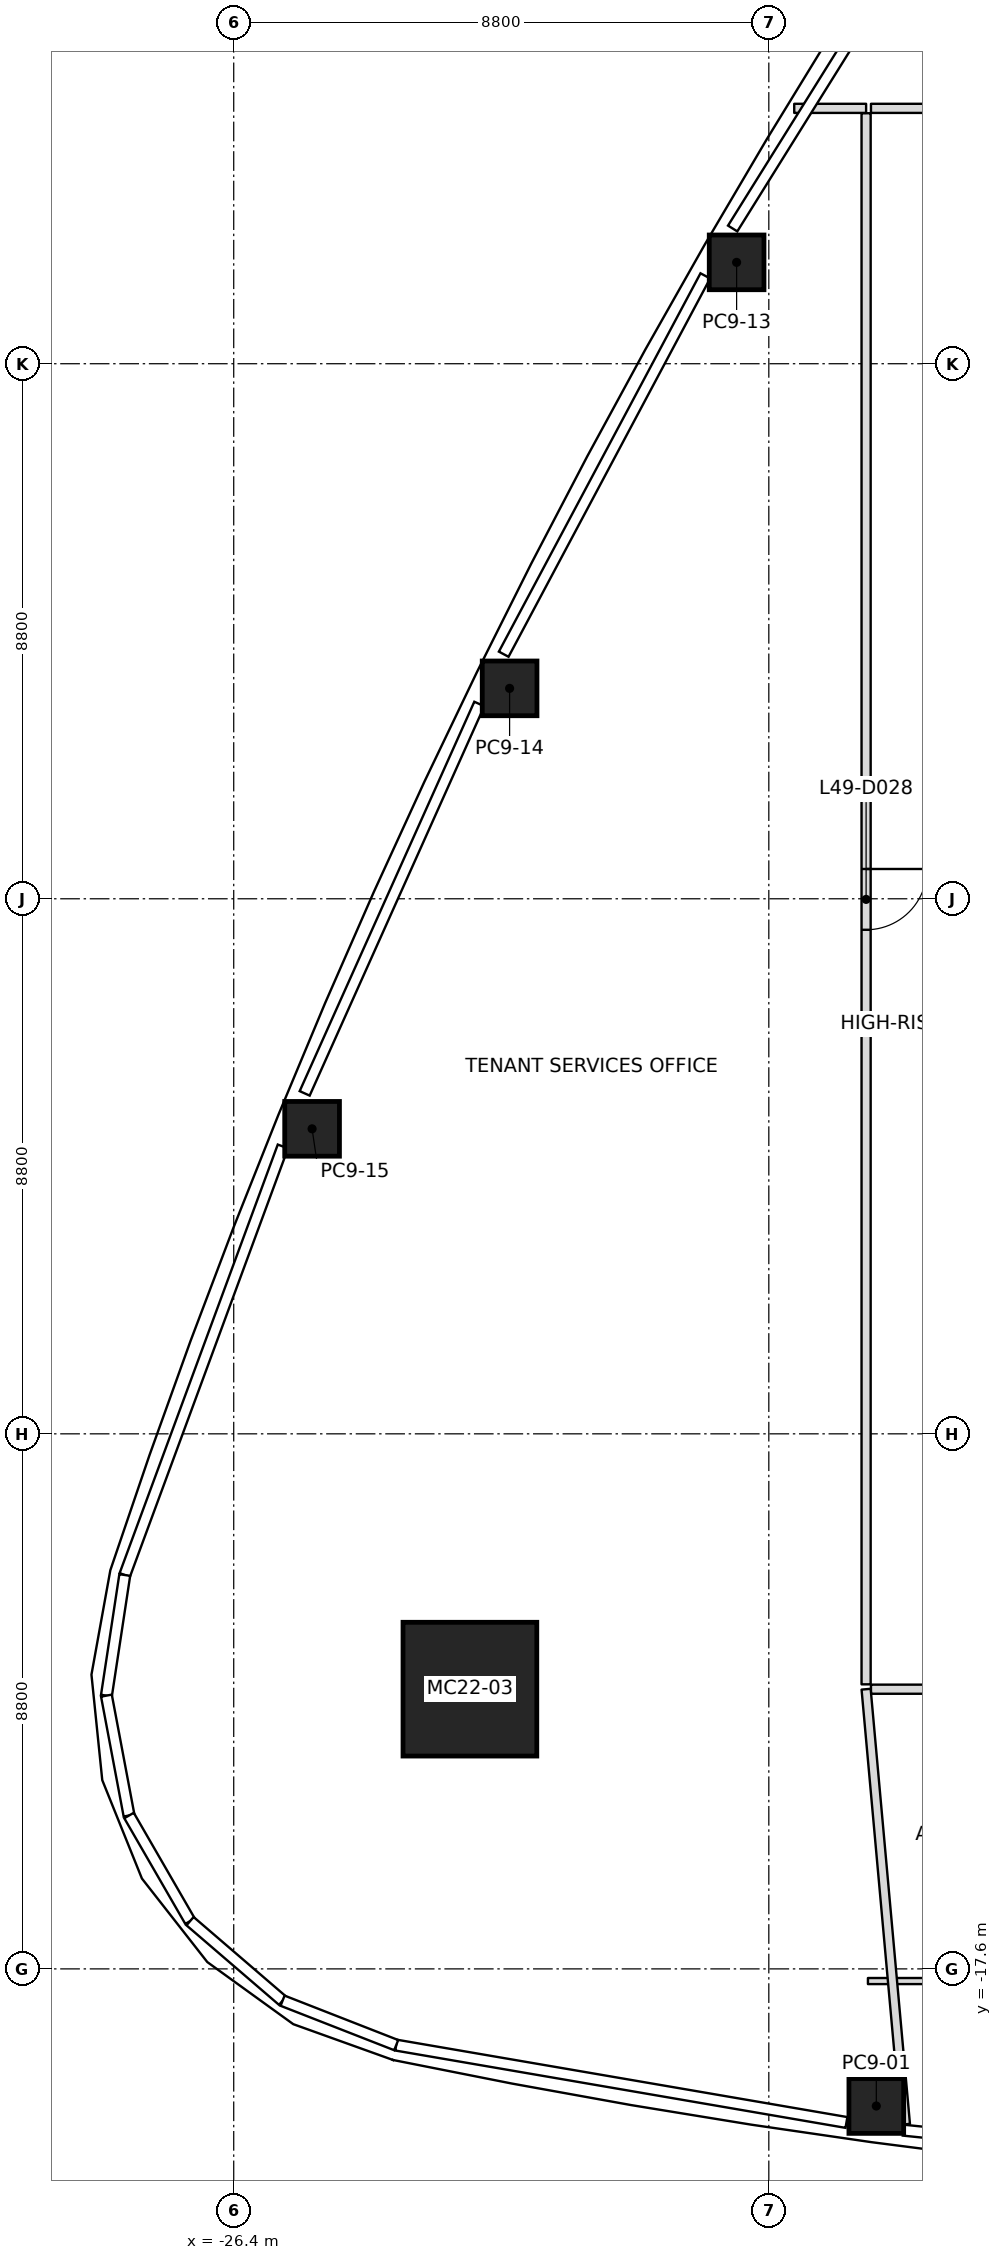
"""IFC4 building model, lengths in metres.
Left out: names, types, materials, properties, quantities, classifications, styles, units other than length and angle.
Written with IfcOpenShell. Run it as: python <this file> out.ifc"""

import sys

from ifc_helpers import new_model, si_unit, direction, frame, frame_2d, origin, origin_2d, place, context, subcontext, project, spatial, rectangle, extrude, clip, halfspace, element, fill, save


model = new_model("IFC4")
c1 = context("Model", 3, precision=1e-05, world=origin(), true_north=direction((0.0, 1.0)))
c2 = subcontext(c1, "Body", "Model", "MODEL_VIEW")
j1 = project(units=[si_unit("LENGTHUNIT", "METRE"), si_unit("PLANEANGLEUNIT", "RADIAN")], contexts=[c1])
p1 = place(None, origin())
s1 = spatial("IfcSite", under=j1, at=p1, CompositionType="ELEMENT")
p2 = place(p1, origin())
s2 = spatial("IfcBuilding", under=s1, at=p2, CompositionType="ELEMENT")
p3 = place(p2, frame((0.0, 0.0, 219.8)))
s3 = spatial("IfcBuildingStorey", under=s2, at=p3, CompositionType="ELEMENT", Elevation=219.8)
p4 = place(p3, frame((-22.516, -13.0, 0.0), z_axis=(0.015527667253, 0.008950445753, 0.999839377635), x_axis=(0.999879438507, -0.000138996301, -0.015527045126)))
e1 = element("IfcColumn", 1, at=p4, inside=s3, PredefinedType="COLUMN", context=c2, shape_type="SweptSolid", body=[
    clip(clip(extrude(rectangle(XDim=2.2, YDim=2.2, at=origin_2d()), origin(), (0.0, 0.0, 1.0), 7.201), halfspace(frame((0.0, 0.0, 0.003)), True)), halfspace(frame((0.0, 0.0, 7.19)), False)),
])
p5 = place(p3, frame((-15.832, -19.855, 0.0), z_axis=(0.009731160111, 0.005764101808, 0.999936037781), x_axis=(-0.990706613393, 0.135727393239, 0.008858944803)))
e2 = element("IfcColumn", 2, at=p5, inside=s3, PredefinedType="COLUMN", context=c2, shape_type="SweptSolid", body=[
    clip(clip(extrude(rectangle(XDim=0.9, YDim=0.9, at=origin_2d()), origin(), (0.0, 0.0, 1.0), 7.2), halfspace(frame((0.0, 0.0, 0.001)), True)), halfspace(frame((0.0, 0.0, 7.197)), False)),
])
p6 = place(p3, frame((-18.13, 10.467, 0.0), z_axis=(0.005493091126, -0.003153441202, 0.999979940678), x_axis=(0.499992456431, 0.866029758883, -1.5530513e-05)))
e3 = element("IfcColumn", 3, at=p6, inside=s3, PredefinedType="COLUMN", context=c2, shape_type="SweptSolid", body=[
    clip(clip(extrude(rectangle(XDim=0.9, YDim=0.9, at=origin_2d()), origin(), (0.0, 0.0, 1.0), 7.2), halfspace(frame((0.0, 0.0, 0.0)), True)), halfspace(frame((0.0, 0.0, 7.199)), False)),
])
p7 = place(p3, frame((-21.863, 3.461, 0.0), z_axis=(0.007832652989, 0.001118950427, 0.999968698259), x_axis=(0.439944481987, 0.898013943218, -0.004450904868)))
e4 = element("IfcColumn", 4, at=p7, inside=s3, PredefinedType="COLUMN", context=c2, shape_type="SweptSolid", body=[
    clip(clip(extrude(rectangle(XDim=0.9, YDim=0.9, at=origin_2d()), origin(), (0.0, 0.0, 1.0), 7.2), halfspace(frame((0.0, 0.0, 0.001)), True)), halfspace(frame((0.0, 0.0, 7.198)), False)),
])
p8 = place(p3, frame((-25.111, -3.784, 0.0), z_axis=(0.009900687447, 0.005560660073, 0.999935525645), x_axis=(0.377861048249, 0.925819636439, -0.00888982559)))
e5 = element("IfcColumn", 5, at=p8, inside=s3, PredefinedType="COLUMN", context=c2, shape_type="SweptSolid", body=[
    clip(clip(extrude(rectangle(XDim=0.9, YDim=0.9, at=origin_2d()), origin(), (0.0, 0.0, 1.0), 7.2), halfspace(frame((0.0, 0.0, 0.001)), True)), halfspace(frame((0.0, 0.0, 7.197)), False)),
])
p9 = place(p3, frame((-16.0, 13.0, 0.0), z_axis=(0.0, 0.0, 1.0), x_axis=(-1.0, 0.0, 0.0)))
e6 = element("IfcWall", 6, at=p9, inside=s3, PredefinedType="PARTITIONING", context=c2, shape_type="SweptSolid", body=[
    extrude(rectangle(XDim=1.182, YDim=0.15, at=frame_2d((0.591, 0.0))), origin(), (0.0, 0.0, 1.0), 6.434),
])
p10 = place(p3, frame((-16.0, -13.0, 0.0), z_axis=(0.0, 0.0, 1.0), x_axis=(0.089975086332, -0.995944016418, 0.0)))
e7 = element("IfcWall", 7, at=p10, inside=s3, PredefinedType="PARTITIONING", context=c2, shape_type="SweptSolid", body=[
    extrude(rectangle(XDim=7.185, YDim=0.15, at=frame_2d((3.593, 0.0))), origin(), (0.0, 0.0, 1.0), 6.284),
])
p11 = place(p3, frame((-16.0, 12.92, 0.0), z_axis=(0.0, 0.0, 1.0), x_axis=(0.0, -1.0, 0.0)))
e8 = element("IfcWall", 8, at=p11, inside=s3, PredefinedType="PARTITIONING", context=c2, shape_type="SweptSolid", body=[
    extrude(rectangle(XDim=25.84, YDim=0.15, at=frame_2d((12.92, 0.0))), origin(), (0.0, 0.0, 1.0), 6.367),
])
p12 = place(p11, frame((12.43, 0.0, 0.0)))
e9 = element("IfcOpeningElement", 9, at=p12, cuts=e8, PredefinedType="OPENING", context=c2, shape_type="SweptSolid", body=[
    extrude(rectangle(XDim=1.0, YDim=2.1, at=frame_2d((0.5, 1.05))), frame((0.0, 0.075, 0.0), z_axis=(0.0, -1.0, 0.0), x_axis=(1.0, 0.0, 0.0)), (0.0, 0.0, 1.0), 0.15),
])
p13 = place(p3, frame((-15.92, -13.0, 0.0), z_axis=(0.0, 0.0, 1.0), x_axis=(1.0, 0.0, 0.0)))
e10 = element("IfcWall", 10, at=p13, inside=s3, PredefinedType="PARTITIONING", context=c2, shape_type="SweptSolid", body=[
    extrude(rectangle(XDim=31.84, YDim=0.15, at=frame_2d((15.92, 0.0))), origin(), (0.0, 0.0, 1.0), 6.367),
])
p14 = place(p13, frame((1.52, 0.0, 0.0)))
e11 = element("IfcOpeningElement", 11, at=p14, cuts=e10, PredefinedType="OPENING", context=c2, shape_type="SweptSolid", body=[
    extrude(rectangle(XDim=1.0, YDim=2.1, at=frame_2d((0.5, 1.05))), frame((0.0, 0.075, 0.0), z_axis=(0.0, -1.0, 0.0), x_axis=(1.0, 0.0, 0.0)), (0.0, 0.0, 1.0), 0.15),
])
p15 = place(p13, frame((9.57, 0.0, 0.0)))
e12 = element("IfcOpeningElement", 12, at=p15, cuts=e10, PredefinedType="OPENING", context=c2, shape_type="SweptSolid", body=[
    extrude(rectangle(XDim=1.0, YDim=2.1, at=frame_2d((0.5, 1.05))), frame((0.0, 0.075, 0.0), z_axis=(0.0, -1.0, 0.0), x_axis=(1.0, 0.0, 0.0)), (0.0, 0.0, 1.0), 0.15),
])
p16 = place(p13, frame((17.52, 0.0, 0.0)))
e13 = element("IfcOpeningElement", 13, at=p16, cuts=e10, PredefinedType="OPENING", context=c2, shape_type="SweptSolid", body=[
    extrude(rectangle(XDim=1.0, YDim=2.1, at=frame_2d((0.5, 1.05))), frame((0.0, 0.075, 0.0), z_axis=(0.0, -1.0, 0.0), x_axis=(1.0, 0.0, 0.0)), (0.0, 0.0, 1.0), 0.15),
])
p17 = place(p13, frame((25.57, 0.0, 0.0)))
e14 = element("IfcOpeningElement", 14, at=p17, cuts=e10, PredefinedType="OPENING", context=c2, shape_type="SweptSolid", body=[
    extrude(rectangle(XDim=1.0, YDim=2.1, at=frame_2d((0.5, 1.05))), frame((0.0, 0.075, 0.0), z_axis=(0.0, -1.0, 0.0), x_axis=(1.0, 0.0, 0.0)), (0.0, 0.0, 1.0), 0.15),
])
p18 = place(p3, frame((15.92, 13.0, 0.0), z_axis=(0.0, 0.0, 1.0), x_axis=(-1.0, 0.0, 0.0)))
e15 = element("IfcWall", 15, at=p18, inside=s3, PredefinedType="PARTITIONING", context=c2, shape_type="SweptSolid", body=[
    extrude(rectangle(XDim=31.84, YDim=0.15, at=frame_2d((15.92, 0.0))), origin(), (0.0, 0.0, 1.0), 6.433),
])
p19 = place(p18, frame((5.91, 0.0, 0.0)))
e16 = element("IfcOpeningElement", 16, at=p19, cuts=e15, PredefinedType="OPENING", context=c2, shape_type="SweptSolid", body=[
    extrude(rectangle(XDim=1.0, YDim=2.1, at=frame_2d((0.5, 1.05))), frame((0.0, 0.075, 0.0), z_axis=(0.0, -1.0, 0.0), x_axis=(1.0, 0.0, 0.0)), (0.0, 0.0, 1.0), 0.15),
])
p20 = place(p18, frame((21.73, 0.0, 0.0)))
e17 = element("IfcOpeningElement", 17, at=p20, cuts=e15, PredefinedType="OPENING", context=c2, shape_type="SweptSolid", body=[
    extrude(rectangle(XDim=1.4, YDim=2.1, at=frame_2d((0.7, 1.05))), frame((0.0, 0.075, 0.0), z_axis=(0.0, -1.0, 0.0), x_axis=(1.0, 0.0, 0.0)), (0.0, 0.0, 1.0), 0.15),
])
p21 = place(p3, frame((-11.8, -17.8, 0.0), z_axis=(0.0, 0.0, 1.0), x_axis=(-1.0, 0.0, 0.0)))
e18 = element("IfcWall", 18, at=p21, inside=s3, PredefinedType="PARTITIONING", context=c2, shape_type="SweptSolid", body=[
    extrude(rectangle(XDim=4.17, YDim=0.1, at=frame_2d((2.085, 0.0))), origin(), (0.0, 0.0, 1.0), 6.493),
])
p22 = place(p12, origin())
e19 = element("IfcDoor", 19, at=p22, inside=s3, OperationType="SINGLE_SWING_LEFT", PredefinedType="DOOR", context=c2, shape_type="SweptSolid", body=[
    extrude(rectangle(XDim=1.0, YDim=2.1, at=frame_2d((0.5, 1.05))), frame((0.0, 0.025, 0.0), z_axis=(0.0, -1.0, 0.0), x_axis=(1.0, 0.0, 0.0)), (0.0, 0.0, 1.0), 0.05),
])
fill(e9, e19)
save(model, sys.argv[1])
